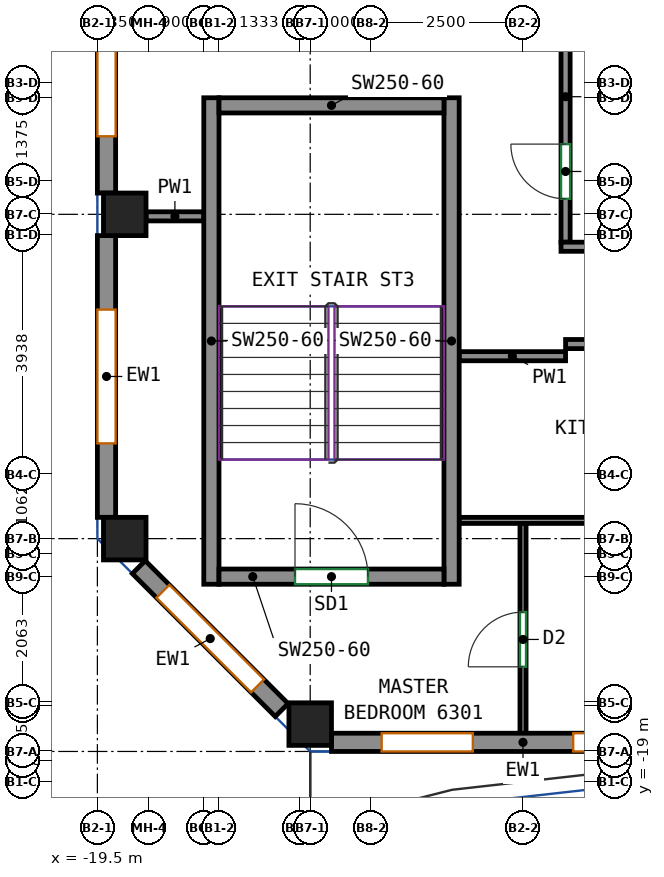
"""IFC4 building model, lengths in metres.
Left out: names, types, materials, properties, quantities, classifications, styles, units other than length and angle.
Written with IfcOpenShell. Run it as: python <this file> out.ifc"""

import sys

from ifc_helpers import new_model, si_unit, direction, frame, frame_2d, origin, origin_2d, place, context, subcontext, project, spatial, rectangle, extrude, source, transform, mapped, element, fill, save


model = new_model("IFC4")
c1 = context("Model", 3, precision=1e-05, world=origin(), true_north=direction((0.0, 1.0)))
c2 = subcontext(c1, "Body", "Model", "MODEL_VIEW")
j1 = project(units=[si_unit("LENGTHUNIT", "METRE"), si_unit("PLANEANGLEUNIT", "RADIAN")], contexts=[c1])
p1 = place(None, origin())
s1 = spatial("IfcSite", under=j1, at=p1, CompositionType="ELEMENT")
p2 = place(p1, origin())
s2 = spatial("IfcBuilding", under=s1, at=p2, CompositionType="ELEMENT")
p3 = place(p2, frame((0.0, 0.0, 259.4)))
s3 = spatial("IfcBuildingStorey", under=s2, at=p3, CompositionType="ELEMENT", Elevation=259.4)
m1 = source(origin(), c2, "Body", "SweptSolid", [
    extrude(rectangle(XDim=0.7, YDim=0.7, at=origin_2d()), origin(), (0.0, 0.0, 1.0), 3.0),
])
for number, where, z_axis, x_axis in (
    (1, (-19.05, -15.0, 0.0), (0.0, 0.0, 1.0), (1.0, 0.0, 0.0)),
    (2, (-19.05, -9.667, 0.0), (0.0, 0.0, 1.0), (1.0, 0.0, 0.0)),
    (3, (-16.0, -18.05, 0.0), (0.0, 0.0, 1.0), (1.0, 0.0, 0.0)),
):
    element("IfcColumn", number, at=place(p3, frame(where, z_axis=z_axis, x_axis=x_axis)), inside=s3, PredefinedType="COLUMN", context=c2, shape_type="MappedRepresentation", body=[
        mapped(m1, transform((0.0, 0.0, 0.0))),
    ])
m2 = source(origin(), c2, "Body", "SweptSolid", [
    extrude(rectangle(XDim=8.0, YDim=0.25, at=frame_2d((4.0, 0.0))), origin(), (0.0, 0.0, 1.0), 3.0),
])
for number, where, z_axis, x_axis in (
    (4, (-17.625, -15.75, 0.0), (0.0, 0.0, 1.0), (0.0, 1.0, 0.0)),
    (5, (-13.675, -15.75, 0.0), (0.0, 0.0, 1.0), (0.0, 1.0, 0.0)),
):
    element("IfcWall", number, at=place(p3, frame(where, z_axis=z_axis, x_axis=x_axis)), inside=s3, PredefinedType="SHEAR", context=c2, shape_type="MappedRepresentation", body=[
        mapped(m2, transform((0.0, 0.0, 0.0))),
    ])
m3 = source(origin(), c2, "Body", "SweptSolid", [
    extrude(rectangle(XDim=3.7, YDim=0.25, at=frame_2d((1.85, 0.0))), origin(), (0.0, 0.0, 1.0), 3.0),
])
p4 = place(p3, frame((-17.5, -15.625, 0.0), z_axis=(0.0, 0.0, 1.0), x_axis=(1.0, 0.0, 0.0)))
e6 = element("IfcWall", 6, at=p4, inside=s3, PredefinedType="SHEAR", context=c2, shape_type="MappedRepresentation", body=[
    mapped(m3, transform((0.0, 0.0, 0.0))),
])
p5 = place(p4, frame((1.25, 0.0, 0.0)))
e7 = element("IfcOpeningElement", 7, at=p5, cuts=e6, PredefinedType="OPENING", context=c2, shape_type="SweptSolid", body=[
    extrude(rectangle(XDim=1.2, YDim=2.1, at=frame_2d((0.6, 1.05))), frame((0.0, 0.135, 0.0), z_axis=(0.0, -1.0, 0.0), x_axis=(1.0, 0.0, 0.0)), (0.0, 0.0, 1.0), 0.27),
])
p6 = place(p3, frame((-17.5, -7.875, 0.0), z_axis=(0.0, 0.0, 1.0), x_axis=(1.0, 0.0, 0.0)))
e8 = element("IfcWall", 8, at=p6, inside=s3, PredefinedType="SHEAR", context=c2, shape_type="MappedRepresentation", body=[
    mapped(m3, transform((0.0, 0.0, 0.0))),
])
m4 = source(origin(), c2, "Body", "SweptSolid", [
    extrude(rectangle(XDim=6.3, YDim=0.3, at=frame_2d((3.15, 0.0))), origin(), (0.0, 0.0, 1.0), 3.0),
])
p7 = place(p3, frame((-15.65, -18.35, 0.0), z_axis=(0.0, 0.0, 1.0), x_axis=(1.0, 0.0, 0.0)))
e9 = element("IfcWall", 9, at=p7, inside=s3, PredefinedType="SOLIDWALL", context=c2, shape_type="MappedRepresentation", body=[
    mapped(m4, transform((0.0, 0.0, 0.0))),
])
p8 = place(p7, frame((0.825, 0.0, 0.8)))
e10 = element("IfcOpeningElement", 10, at=p8, cuts=e9, PredefinedType="OPENING", context=c2, shape_type="SweptSolid", body=[
    extrude(rectangle(XDim=1.5, YDim=2.05, at=frame_2d((0.75, 1.025))), frame((0.0, 0.16, 0.0), z_axis=(0.0, -1.0, 0.0), x_axis=(1.0, 0.0, 0.0)), (0.0, 0.0, 1.0), 0.32),
])
p9 = place(p7, frame((3.975, 0.0, 0.8)))
e11 = element("IfcOpeningElement", 11, at=p9, cuts=e9, PredefinedType="OPENING", context=c2, shape_type="SweptSolid", body=[
    extrude(rectangle(XDim=1.5, YDim=2.05, at=frame_2d((0.75, 1.025))), frame((0.0, 0.16, 0.0), z_axis=(0.0, -1.0, 0.0), x_axis=(1.0, 0.0, 0.0)), (0.0, 0.0, 1.0), 0.32),
])
m5 = source(origin(), c2, "Body", "SweptSolid", [
    extrude(rectangle(XDim=8.133, YDim=0.3, at=frame_2d((4.067, 0.0))), origin(), (0.0, 0.0, 1.0), 3.0),
])
p10 = place(p3, frame((-19.35, -1.183, 0.0), z_axis=(0.0, 0.0, 1.0), x_axis=(0.0, -1.0, 0.0)))
e12 = element("IfcWall", 12, at=p10, inside=s3, PredefinedType="SOLIDWALL", context=c2, shape_type="MappedRepresentation", body=[
    mapped(m5, transform((0.0, 0.0, 0.0))),
])
p11 = place(p10, frame((0.933, 0.0, 0.8)))
e13 = element("IfcOpeningElement", 13, at=p11, cuts=e12, PredefinedType="OPENING", context=c2, shape_type="SweptSolid", body=[
    extrude(rectangle(XDim=2.2, YDim=2.05, at=frame_2d((1.1, 1.025))), frame((0.0, 0.16, 0.0), z_axis=(0.0, -1.0, 0.0), x_axis=(1.0, 0.0, 0.0)), (0.0, 0.0, 1.0), 0.32),
])
p12 = place(p10, frame((5.0, 0.0, 0.8)))
e14 = element("IfcOpeningElement", 14, at=p12, cuts=e12, PredefinedType="OPENING", context=c2, shape_type="SweptSolid", body=[
    extrude(rectangle(XDim=2.2, YDim=2.05, at=frame_2d((1.1, 1.025))), frame((0.0, 0.16, 0.0), z_axis=(0.0, -1.0, 0.0), x_axis=(1.0, 0.0, 0.0)), (0.0, 0.0, 1.0), 0.32),
])
m6 = source(origin(), c2, "Body", "SweptSolid", [
    extrude(rectangle(XDim=4.633, YDim=0.3, at=frame_2d((2.317, 0.0))), origin(), (0.0, 0.0, 1.0), 3.0),
])
p13 = place(p3, frame((-19.35, -10.017, 0.0), z_axis=(0.0, 0.0, 1.0), x_axis=(0.0, -1.0, 0.0)))
e15 = element("IfcWall", 15, at=p13, inside=s3, PredefinedType="SOLIDWALL", context=c2, shape_type="MappedRepresentation", body=[
    mapped(m6, transform((0.0, 0.0, 0.0))),
])
p14 = place(p13, frame((1.217, 0.0, 0.8)))
e16 = element("IfcOpeningElement", 16, at=p14, cuts=e15, PredefinedType="OPENING", context=c2, shape_type="SweptSolid", body=[
    extrude(rectangle(XDim=2.2, YDim=2.05, at=frame_2d((1.1, 1.025))), frame((0.0, 0.16, 0.0), z_axis=(0.0, -1.0, 0.0), x_axis=(1.0, 0.0, 0.0)), (0.0, 0.0, 1.0), 0.32),
])
m7 = source(origin(), c2, "Body", "SweptSolid", [
    extrude(rectangle(XDim=3.323, YDim=0.3, at=frame_2d((1.662, 0.0))), origin(), (0.0, 0.0, 1.0), 3.0),
])
p15 = place(p3, frame((-18.819, -15.469, 0.0), z_axis=(0.0, 0.0, 1.0), x_axis=(0.707070049321, -0.707143511144, 0.0)))
e17 = element("IfcWall", 17, at=p15, inside=s3, PredefinedType="SOLIDWALL", context=c2, shape_type="MappedRepresentation", body=[
    mapped(m7, transform((0.0, 0.0, 0.0))),
])
p16 = place(p15, frame((0.562, 0.0, 0.8)))
e18 = element("IfcOpeningElement", 18, at=p16, cuts=e17, PredefinedType="OPENING", context=c2, shape_type="SweptSolid", body=[
    extrude(rectangle(XDim=2.2, YDim=2.05, at=frame_2d((1.1, 1.025))), frame((0.0, 0.16, 0.0), z_axis=(0.0, -1.0, 0.0), x_axis=(1.0, 0.0, 0.0)), (0.0, 0.0, 1.0), 0.32),
])
p17 = place(p3, frame((-11.8, -11.8, 0.0), z_axis=(0.0, 0.0, 1.0), x_axis=(1.0, 0.0, 0.0)))
e19 = element("IfcWall", 19, at=p17, inside=s3, PredefinedType="PARTITIONING", context=c2, shape_type="SweptSolid", body=[
    extrude(rectangle(XDim=29.55, YDim=0.15, at=frame_2d((14.775, 0.0))), origin(), (0.0, 0.0, 1.0), 3.0),
])
p18 = place(p17, frame((8.26, 0.0, 0.0)))
e20 = element("IfcOpeningElement", 20, at=p18, cuts=e19, PredefinedType="OPENING", context=c2, shape_type="SweptSolid", body=[
    extrude(rectangle(XDim=1.0, YDim=2.1, at=frame_2d((0.5, 1.05))), frame((0.0, 0.085, 0.0), z_axis=(0.0, -1.0, 0.0), x_axis=(1.0, 0.0, 0.0)), (0.0, 0.0, 1.0), 0.17),
])
p19 = place(p3, frame((-13.55, -12.0, 0.0), z_axis=(0.0, 0.0, 1.0), x_axis=(1.0, 0.0, 0.0)))
e21 = element("IfcWall", 21, at=p19, inside=s3, PredefinedType="PARTITIONING", context=c2, shape_type="SweptSolid", body=[
    extrude(rectangle(XDim=1.75, YDim=0.15, at=frame_2d((0.875, 0.0))), origin(), (0.0, 0.0, 1.0), 3.0),
])
p20 = place(p3, frame((-18.7, -9.7, 0.0), z_axis=(0.0, 0.0, 1.0), x_axis=(1.0, 0.0, 0.0)))
e22 = element("IfcWall", 22, at=p20, inside=s3, PredefinedType="PARTITIONING", context=c2, shape_type="SweptSolid", body=[
    extrude(rectangle(XDim=0.95, YDim=0.15, at=frame_2d((0.475, 0.0))), origin(), (0.0, 0.0, 1.0), 3.0),
])
p21 = place(p3, frame((-11.8, -10.125, 0.0), z_axis=(0.0, 0.0, 1.0), x_axis=(0.0, 1.0, 0.0)))
e23 = element("IfcWall", 23, at=p21, inside=s3, PredefinedType="PARTITIONING", context=c2, shape_type="SweptSolid", body=[
    extrude(rectangle(XDim=4.785, YDim=0.15, at=frame_2d((2.393, 0.0))), origin(), (0.0, 0.0, 1.0), 3.0),
])
p22 = place(p21, frame((0.713, 0.0, 0.0)))
e24 = element("IfcOpeningElement", 24, at=p22, cuts=e23, PredefinedType="OPENING", context=c2, shape_type="SweptSolid", body=[
    extrude(rectangle(XDim=0.9, YDim=2.1, at=frame_2d((0.45, 1.05))), frame((0.0, 0.085, 0.0), z_axis=(0.0, -1.0, 0.0), x_axis=(1.0, 0.0, 0.0)), (0.0, 0.0, 1.0), 0.17),
])
p23 = place(p3, frame((-11.875, -10.2, 0.0), z_axis=(0.0, 0.0, 1.0), x_axis=(1.0, 0.0, 0.0)))
e25 = element("IfcWall", 25, at=p23, inside=s3, PredefinedType="PARTITIONING", context=c2, shape_type="SweptSolid", body=[
    extrude(rectangle(XDim=2.4, YDim=0.15, at=frame_2d((1.2, 0.0))), origin(), (0.0, 0.0, 1.0), 3.0),
])
p24 = place(p3, frame((-13.55, -14.7, 0.0), z_axis=(0.0, 0.0, 1.0), x_axis=(1.0, 0.0, 0.0)))
e26 = element("IfcWall", 26, at=p24, inside=s3, PredefinedType="PARTITIONING", context=c2, shape_type="SweptSolid", body=[
    extrude(rectangle(XDim=4.45, YDim=0.1, at=frame_2d((2.225, 0.0))), origin(), (0.0, 0.0, 1.0), 3.0),
])
p25 = place(p3, frame((-12.5, -18.25, 0.0), z_axis=(0.0, 0.0, 1.0), x_axis=(0.0, 1.0, 0.0)))
e27 = element("IfcWall", 27, at=p25, inside=s3, PredefinedType="PARTITIONING", context=c2, shape_type="SweptSolid", body=[
    extrude(rectangle(XDim=3.498, YDim=0.1, at=frame_2d((1.749, 0.0))), origin(), (0.0, 0.0, 1.0), 3.0),
])
p26 = place(p25, frame((1.142, 0.0, 0.0)))
e28 = element("IfcOpeningElement", 28, at=p26, cuts=e27, PredefinedType="OPENING", context=c2, shape_type="SweptSolid", body=[
    extrude(rectangle(XDim=0.9, YDim=2.1, at=frame_2d((0.45, 1.05))), frame((0.0, 0.06, 0.0), z_axis=(0.0, -1.0, 0.0), x_axis=(1.0, 0.0, 0.0)), (0.0, 0.0, 1.0), 0.12),
])
p27 = place(p8, origin())
e29 = element("IfcWindow", 29, at=p27, inside=s3, PartitioningType="SINGLE_PANEL", PredefinedType="WINDOW", context=c2, shape_type="SweptSolid", body=[
    extrude(rectangle(XDim=1.5, YDim=2.05, at=frame_2d((0.75, 1.025))), frame((0.0, 0.03, 0.0), z_axis=(0.0, -1.0, 0.0), x_axis=(1.0, 0.0, 0.0)), (0.0, 0.0, 1.0), 0.06),
])
fill(e10, e29)
p28 = place(p9, origin())
e30 = element("IfcWindow", 30, at=p28, inside=s3, PartitioningType="SINGLE_PANEL", PredefinedType="WINDOW", context=c2, shape_type="SweptSolid", body=[
    extrude(rectangle(XDim=1.5, YDim=2.05, at=frame_2d((0.75, 1.025))), frame((0.0, 0.03, 0.0), z_axis=(0.0, -1.0, 0.0), x_axis=(1.0, 0.0, 0.0)), (0.0, 0.0, 1.0), 0.06),
])
fill(e11, e30)
p29 = place(p12, origin())
e31 = element("IfcWindow", 31, at=p29, inside=s3, PartitioningType="SINGLE_PANEL", PredefinedType="WINDOW", context=c2, shape_type="SweptSolid", body=[
    extrude(rectangle(XDim=2.2, YDim=2.05, at=frame_2d((1.1, 1.025))), frame((0.0, 0.03, 0.0), z_axis=(0.0, -1.0, 0.0), x_axis=(1.0, 0.0, 0.0)), (0.0, 0.0, 1.0), 0.06),
])
fill(e14, e31)
p30 = place(p14, origin())
e32 = element("IfcWindow", 32, at=p30, inside=s3, PartitioningType="SINGLE_PANEL", PredefinedType="WINDOW", context=c2, shape_type="SweptSolid", body=[
    extrude(rectangle(XDim=2.2, YDim=2.05, at=frame_2d((1.1, 1.025))), frame((0.0, 0.03, 0.0), z_axis=(0.0, -1.0, 0.0), x_axis=(1.0, 0.0, 0.0)), (0.0, 0.0, 1.0), 0.06),
])
fill(e16, e32)
p31 = place(p16, origin())
e33 = element("IfcWindow", 33, at=p31, inside=s3, PartitioningType="SINGLE_PANEL", PredefinedType="WINDOW", context=c2, shape_type="SweptSolid", body=[
    extrude(rectangle(XDim=2.2, YDim=2.05, at=frame_2d((1.1, 1.025))), frame((0.0, 0.03, 0.0), z_axis=(0.0, -1.0, 0.0), x_axis=(1.0, 0.0, 0.0)), (0.0, 0.0, 1.0), 0.06),
])
fill(e18, e33)
p32 = place(p5, origin())
e34 = element("IfcDoor", 34, at=p32, inside=s3, OperationType="DOUBLE_DOOR_SINGLE_SWING", PredefinedType="DOOR", context=c2, shape_type="SweptSolid", body=[
    extrude(rectangle(XDim=1.2, YDim=2.1, at=frame_2d((0.6, 1.05))), frame((0.0, 0.025, 0.0), z_axis=(0.0, -1.0, 0.0), x_axis=(1.0, 0.0, 0.0)), (0.0, 0.0, 1.0), 0.05),
])
fill(e7, e34)
p33 = place(p26, origin())
e35 = element("IfcDoor", 35, at=p33, inside=s3, OperationType="SINGLE_SWING_LEFT", PredefinedType="DOOR", context=c2, shape_type="SweptSolid", body=[
    extrude(rectangle(XDim=0.9, YDim=2.1, at=frame_2d((0.45, 1.05))), frame((0.0, 0.025, 0.0), z_axis=(0.0, -1.0, 0.0), x_axis=(1.0, 0.0, 0.0)), (0.0, 0.0, 1.0), 0.05),
])
fill(e28, e35)
p34 = place(p22, origin())
e36 = element("IfcDoor", 36, at=p34, inside=s3, OperationType="SINGLE_SWING_RIGHT", PredefinedType="DOOR", context=c2, shape_type="SweptSolid", body=[
    extrude(rectangle(XDim=0.9, YDim=2.1, at=frame_2d((0.45, 1.05))), frame((0.0, 0.025, 0.0), z_axis=(0.0, -1.0, 0.0), x_axis=(1.0, 0.0, 0.0)), (0.0, 0.0, 1.0), 0.05),
])
fill(e24, e36)
save(model, sys.argv[1])
